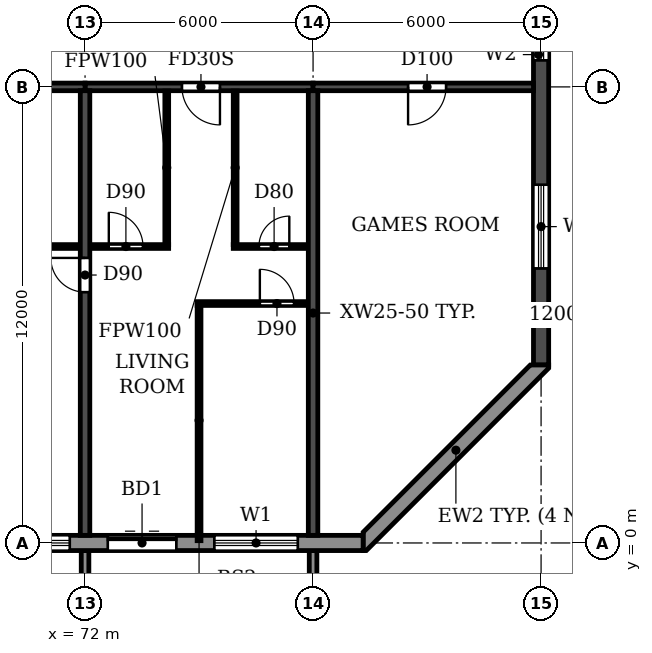
"""IFC4 building model, lengths in metres.
Left out: names, types, materials, properties, quantities, classifications, styles, units other than length and angle.
Written with IfcOpenShell. Run it as: python <this file> out.ifc"""

import sys

from ifc_helpers import new_model, si_unit, direction, frame, frame_2d, origin, place, context, subcontext, project, spatial, polyline, rectangle, outline, extrude, source, transform, mapped, element, fill, save


model = new_model("IFC4")
c1 = context("Model", 3, precision=1e-05, world=origin(), true_north=direction((0.0, 1.0)))
c2 = subcontext(c1, "Body", "Model", "MODEL_VIEW")
j1 = project(units=[si_unit("LENGTHUNIT", "METRE"), si_unit("PLANEANGLEUNIT", "RADIAN")], contexts=[c1])
p1 = place(None, origin())
s1 = spatial("IfcSite", under=j1, at=p1, CompositionType="ELEMENT")
p2 = place(p1, origin())
s2 = spatial("IfcBuilding", under=s1, at=p2, CompositionType="ELEMENT")
p3 = place(p2, frame((0.0, 0.0, 181.8)))
s3 = spatial("IfcBuildingStorey", under=s2, at=p3, CompositionType="ELEMENT", Elevation=181.8)
p4 = place(p3, frame((72.0, 0.2, 0.0), z_axis=(0.0, 0.0, 1.0), x_axis=(0.0, 1.0, 0.0)))
e1 = element("IfcWall", 1, at=p4, inside=s3, PredefinedType="SHEAR", context=c2, shape_type="SweptSolid", body=[
    extrude(rectangle(XDim=11.7, YDim=0.25, at=frame_2d((5.85, 0.0))), origin(), (0.0, 0.0, 1.0), 3.08),
])
p5 = place(p4, frame((6.4, 0.0, 0.0)))
e2 = element("IfcOpeningElement", 2, at=p5, cuts=e1, PredefinedType="OPENING", context=c2, shape_type="SweptSolid", body=[
    extrude(rectangle(XDim=0.9, YDim=2.1, at=frame_2d((0.45, 1.05))), frame((0.0, 0.135, 0.0), z_axis=(0.0, -1.0, 0.0), x_axis=(1.0, 0.0, 0.0)), (0.0, 0.0, 1.0), 0.27),
])
p6 = place(p3, frame((78.0, 0.2, 0.0), z_axis=(0.0, 0.0, 1.0), x_axis=(0.0, 1.0, 0.0)))
e3 = element("IfcWall", 3, at=p6, inside=s3, PredefinedType="SHEAR", context=c2, shape_type="SweptSolid", body=[
    extrude(rectangle(XDim=11.7, YDim=0.25, at=frame_2d((5.85, 0.0))), origin(), (0.0, 0.0, 1.0), 3.08),
])
p7 = place(p3, frame((84.0, 4.683, 0.0), z_axis=(0.0, 0.0, 1.0), x_axis=(0.0, 1.0, 0.0)))
e4 = element("IfcWall", 4, at=p7, inside=s3, PredefinedType="SHEAR", context=c2, shape_type="SweptSolid", body=[
    extrude(rectangle(XDim=31.834, YDim=0.4, at=frame_2d((15.917, 0.0))), origin(), (0.0, 0.0, 1.0), 3.08),
])
p8 = place(p7, frame((23.817, 0.0, 0.9)))
e5 = element("IfcOpeningElement", 5, at=p8, cuts=e4, PredefinedType="OPENING", context=c2, shape_type="SweptSolid", body=[
    extrude(rectangle(XDim=1.2, YDim=1.5, at=frame_2d((0.6, 0.75))), frame((0.0, 0.21, 0.0), z_axis=(0.0, -1.0, 0.0), x_axis=(1.0, 0.0, 0.0)), (0.0, 0.0, 1.0), 0.42),
])
p9 = place(p7, frame((8.017, 0.0, 0.9)))
e6 = element("IfcOpeningElement", 6, at=p9, cuts=e4, PredefinedType="OPENING", context=c2, shape_type="SweptSolid", body=[
    extrude(rectangle(XDim=1.2, YDim=1.5, at=frame_2d((0.6, 0.75))), frame((0.0, 0.21, 0.0), z_axis=(0.0, -1.0, 0.0), x_axis=(1.0, 0.0, 0.0)), (0.0, 0.0, 1.0), 0.42),
])
p10 = place(p7, frame((27.694, 0.0, 0.6)))
e7 = element("IfcOpeningElement", 7, at=p10, cuts=e4, PredefinedType="OPENING", context=c2, shape_type="SweptSolid", body=[
    extrude(rectangle(XDim=2.2, YDim=1.8, at=frame_2d((1.1, 0.9))), frame((0.0, 0.21, 0.0), z_axis=(0.0, -1.0, 0.0), x_axis=(1.0, 0.0, 0.0)), (0.0, 0.0, 1.0), 0.42),
])
p11 = place(p7, frame((2.541, 0.0, 0.6)))
e8 = element("IfcOpeningElement", 8, at=p11, cuts=e4, PredefinedType="OPENING", context=c2, shape_type="SweptSolid", body=[
    extrude(rectangle(XDim=2.2, YDim=1.8, at=frame_2d((1.1, 0.9))), frame((0.0, 0.21, 0.0), z_axis=(0.0, -1.0, 0.0), x_axis=(1.0, 0.0, 0.0)), (0.0, 0.0, 1.0), 0.42),
])
p12 = place(p7, frame((15.917, 0.0, 0.9)))
e9 = element("IfcOpeningElement", 9, at=p12, cuts=e4, PredefinedType="OPENING", context=c2, shape_type="SweptSolid", body=[
    extrude(rectangle(XDim=1.2, YDim=1.5, at=frame_2d((0.6, 0.75))), frame((0.0, 0.21, 0.0), z_axis=(0.0, -1.0, 0.0), x_axis=(1.0, 0.0, 0.0)), (0.0, 0.0, 1.0), 0.42),
])
p13 = place(p3, frame((66.0, 12.0, 0.0), z_axis=(0.0, 0.0, 1.0), x_axis=(1.0, 0.0, 0.0)))
e10 = element("IfcWall", 10, at=p13, inside=s3, PredefinedType="SHEAR", context=c2, shape_type="SweptSolid", body=[
    extrude(rectangle(XDim=6.0, YDim=0.2, at=frame_2d((3.0, 0.0))), origin(), (0.0, 0.0, 1.0), 2.48),
])
p14 = place(p3, frame((72.0, 12.0, 0.0), z_axis=(0.0, 0.0, 1.0), x_axis=(1.0, 0.0, 0.0)))
e11 = element("IfcWall", 11, at=p14, inside=s3, PredefinedType="SHEAR", context=c2, shape_type="SweptSolid", body=[
    extrude(rectangle(XDim=6.0, YDim=0.2, at=frame_2d((3.0, 0.0))), origin(), (0.0, 0.0, 1.0), 2.48),
])
p15 = place(p14, frame((2.55, 0.0, 0.0)))
e12 = element("IfcOpeningElement", 12, at=p15, cuts=e11, PredefinedType="OPENING", context=c2, shape_type="SweptSolid", body=[
    extrude(rectangle(XDim=1.0, YDim=2.1, at=frame_2d((0.5, 1.05))), frame((0.0, 0.11, 0.0), z_axis=(0.0, -1.0, 0.0), x_axis=(1.0, 0.0, 0.0)), (0.0, 0.0, 1.0), 0.22),
])
p16 = place(p3, frame((78.0, 12.0, 0.0), z_axis=(0.0, 0.0, 1.0), x_axis=(1.0, 0.0, 0.0)))
e13 = element("IfcWall", 13, at=p16, inside=s3, PredefinedType="SHEAR", context=c2, shape_type="SweptSolid", body=[
    extrude(rectangle(XDim=5.8, YDim=0.2, at=frame_2d((2.9, 0.0))), origin(), (0.0, 0.0, 1.0), 2.48),
])
p17 = place(p16, frame((2.5, 0.0, 0.0)))
e14 = element("IfcOpeningElement", 14, at=p17, cuts=e13, PredefinedType="OPENING", context=c2, shape_type="SweptSolid", body=[
    extrude(rectangle(XDim=1.0, YDim=2.1, at=frame_2d((0.5, 1.05))), frame((0.0, 0.11, 0.0), z_axis=(0.0, -1.0, 0.0), x_axis=(1.0, 0.0, 0.0)), (0.0, 0.0, 1.0), 0.22),
])
p18 = place(p3, frame((22.683, 0.0, 0.0), z_axis=(0.0, 0.0, 1.0), x_axis=(1.0, 0.0, 0.0)))
e15 = element("IfcWall", 15, at=p18, inside=s3, PredefinedType="STANDARD", context=c2, shape_type="SweptSolid", body=[
    extrude(rectangle(XDim=56.634, YDim=0.4, at=frame_2d((28.317, 0.0))), origin(), (0.0, 0.0, 1.0), 3.08),
])
p19 = place(p18, frame((1.717, 0.0, 0.9)))
e16 = element("IfcOpeningElement", 16, at=p19, cuts=e15, PredefinedType="OPENING", context=c2, shape_type="SweptSolid", body=[
    extrude(rectangle(XDim=2.2, YDim=1.5, at=frame_2d((1.1, 0.75))), frame((0.0, 0.21, 0.0), z_axis=(0.0, -1.0, 0.0), x_axis=(1.0, 0.0, 0.0)), (0.0, 0.0, 1.0), 0.42),
])
p20 = place(p18, frame((4.917, 0.0, 0.0)))
e17 = element("IfcOpeningElement", 17, at=p20, cuts=e15, PredefinedType="OPENING", context=c2, shape_type="SweptSolid", body=[
    extrude(rectangle(XDim=1.8, YDim=2.4, at=frame_2d((0.9, 1.2))), frame((0.0, 0.21, 0.0), z_axis=(0.0, -1.0, 0.0), x_axis=(1.0, 0.0, 0.0)), (0.0, 0.0, 1.0), 0.42),
])
p21 = place(p18, frame((7.717, 0.0, 0.9)))
e18 = element("IfcOpeningElement", 18, at=p21, cuts=e15, PredefinedType="OPENING", context=c2, shape_type="SweptSolid", body=[
    extrude(rectangle(XDim=2.2, YDim=1.5, at=frame_2d((1.1, 0.75))), frame((0.0, 0.21, 0.0), z_axis=(0.0, -1.0, 0.0), x_axis=(1.0, 0.0, 0.0)), (0.0, 0.0, 1.0), 0.42),
])
p22 = place(p18, frame((10.717, 0.0, 0.9)))
e19 = element("IfcOpeningElement", 19, at=p22, cuts=e15, PredefinedType="OPENING", context=c2, shape_type="SweptSolid", body=[
    extrude(rectangle(XDim=2.2, YDim=1.5, at=frame_2d((1.1, 0.75))), frame((0.0, 0.21, 0.0), z_axis=(0.0, -1.0, 0.0), x_axis=(1.0, 0.0, 0.0)), (0.0, 0.0, 1.0), 0.42),
])
p23 = place(p18, frame((13.717, 0.0, 0.9)))
e20 = element("IfcOpeningElement", 20, at=p23, cuts=e15, PredefinedType="OPENING", context=c2, shape_type="SweptSolid", body=[
    extrude(rectangle(XDim=2.2, YDim=1.5, at=frame_2d((1.1, 0.75))), frame((0.0, 0.21, 0.0), z_axis=(0.0, -1.0, 0.0), x_axis=(1.0, 0.0, 0.0)), (0.0, 0.0, 1.0), 0.42),
])
p24 = place(p18, frame((16.717, 0.0, 0.9)))
e21 = element("IfcOpeningElement", 21, at=p24, cuts=e15, PredefinedType="OPENING", context=c2, shape_type="SweptSolid", body=[
    extrude(rectangle(XDim=2.2, YDim=1.5, at=frame_2d((1.1, 0.75))), frame((0.0, 0.21, 0.0), z_axis=(0.0, -1.0, 0.0), x_axis=(1.0, 0.0, 0.0)), (0.0, 0.0, 1.0), 0.42),
])
p25 = place(p18, frame((19.717, 0.0, 0.9)))
e22 = element("IfcOpeningElement", 22, at=p25, cuts=e15, PredefinedType="OPENING", context=c2, shape_type="SweptSolid", body=[
    extrude(rectangle(XDim=2.2, YDim=1.5, at=frame_2d((1.1, 0.75))), frame((0.0, 0.21, 0.0), z_axis=(0.0, -1.0, 0.0), x_axis=(1.0, 0.0, 0.0)), (0.0, 0.0, 1.0), 0.42),
])
p26 = place(p18, frame((22.717, 0.0, 0.9)))
e23 = element("IfcOpeningElement", 23, at=p26, cuts=e15, PredefinedType="OPENING", context=c2, shape_type="SweptSolid", body=[
    extrude(rectangle(XDim=2.2, YDim=1.5, at=frame_2d((1.1, 0.75))), frame((0.0, 0.21, 0.0), z_axis=(0.0, -1.0, 0.0), x_axis=(1.0, 0.0, 0.0)), (0.0, 0.0, 1.0), 0.42),
])
p27 = place(p18, frame((25.717, 0.0, 0.9)))
e24 = element("IfcOpeningElement", 24, at=p27, cuts=e15, PredefinedType="OPENING", context=c2, shape_type="SweptSolid", body=[
    extrude(rectangle(XDim=2.2, YDim=1.5, at=frame_2d((1.1, 0.75))), frame((0.0, 0.21, 0.0), z_axis=(0.0, -1.0, 0.0), x_axis=(1.0, 0.0, 0.0)), (0.0, 0.0, 1.0), 0.42),
])
p28 = place(p18, frame((28.717, 0.0, 0.9)))
e25 = element("IfcOpeningElement", 25, at=p28, cuts=e15, PredefinedType="OPENING", context=c2, shape_type="SweptSolid", body=[
    extrude(rectangle(XDim=2.2, YDim=1.5, at=frame_2d((1.1, 0.75))), frame((0.0, 0.21, 0.0), z_axis=(0.0, -1.0, 0.0), x_axis=(1.0, 0.0, 0.0)), (0.0, 0.0, 1.0), 0.42),
])
p29 = place(p18, frame((31.717, 0.0, 0.9)))
e26 = element("IfcOpeningElement", 26, at=p29, cuts=e15, PredefinedType="OPENING", context=c2, shape_type="SweptSolid", body=[
    extrude(rectangle(XDim=2.2, YDim=1.5, at=frame_2d((1.1, 0.75))), frame((0.0, 0.21, 0.0), z_axis=(0.0, -1.0, 0.0), x_axis=(1.0, 0.0, 0.0)), (0.0, 0.0, 1.0), 0.42),
])
p30 = place(p18, frame((34.717, 0.0, 0.9)))
e27 = element("IfcOpeningElement", 27, at=p30, cuts=e15, PredefinedType="OPENING", context=c2, shape_type="SweptSolid", body=[
    extrude(rectangle(XDim=2.2, YDim=1.5, at=frame_2d((1.1, 0.75))), frame((0.0, 0.21, 0.0), z_axis=(0.0, -1.0, 0.0), x_axis=(1.0, 0.0, 0.0)), (0.0, 0.0, 1.0), 0.42),
])
p31 = place(p18, frame((37.917, 0.0, 0.0)))
e28 = element("IfcOpeningElement", 28, at=p31, cuts=e15, PredefinedType="OPENING", context=c2, shape_type="SweptSolid", body=[
    extrude(rectangle(XDim=1.8, YDim=2.4, at=frame_2d((0.9, 1.2))), frame((0.0, 0.21, 0.0), z_axis=(0.0, -1.0, 0.0), x_axis=(1.0, 0.0, 0.0)), (0.0, 0.0, 1.0), 0.42),
])
p32 = place(p18, frame((40.717, 0.0, 0.9)))
e29 = element("IfcOpeningElement", 29, at=p32, cuts=e15, PredefinedType="OPENING", context=c2, shape_type="SweptSolid", body=[
    extrude(rectangle(XDim=2.2, YDim=1.5, at=frame_2d((1.1, 0.75))), frame((0.0, 0.21, 0.0), z_axis=(0.0, -1.0, 0.0), x_axis=(1.0, 0.0, 0.0)), (0.0, 0.0, 1.0), 0.42),
])
p33 = place(p18, frame((43.717, 0.0, 0.9)))
e30 = element("IfcOpeningElement", 30, at=p33, cuts=e15, PredefinedType="OPENING", context=c2, shape_type="SweptSolid", body=[
    extrude(rectangle(XDim=2.2, YDim=1.5, at=frame_2d((1.1, 0.75))), frame((0.0, 0.21, 0.0), z_axis=(0.0, -1.0, 0.0), x_axis=(1.0, 0.0, 0.0)), (0.0, 0.0, 1.0), 0.42),
])
p34 = place(p18, frame((46.717, 0.0, 0.9)))
e31 = element("IfcOpeningElement", 31, at=p34, cuts=e15, PredefinedType="OPENING", context=c2, shape_type="SweptSolid", body=[
    extrude(rectangle(XDim=2.2, YDim=1.5, at=frame_2d((1.1, 0.75))), frame((0.0, 0.21, 0.0), z_axis=(0.0, -1.0, 0.0), x_axis=(1.0, 0.0, 0.0)), (0.0, 0.0, 1.0), 0.42),
])
p35 = place(p18, frame((49.917, 0.0, 0.0)))
e32 = element("IfcOpeningElement", 32, at=p35, cuts=e15, PredefinedType="OPENING", context=c2, shape_type="SweptSolid", body=[
    extrude(rectangle(XDim=1.8, YDim=2.4, at=frame_2d((0.9, 1.2))), frame((0.0, 0.21, 0.0), z_axis=(0.0, -1.0, 0.0), x_axis=(1.0, 0.0, 0.0)), (0.0, 0.0, 1.0), 0.42),
])
p36 = place(p18, frame((52.717, 0.0, 0.9)))
e33 = element("IfcOpeningElement", 33, at=p36, cuts=e15, PredefinedType="OPENING", context=c2, shape_type="SweptSolid", body=[
    extrude(rectangle(XDim=2.2, YDim=1.5, at=frame_2d((1.1, 0.75))), frame((0.0, 0.21, 0.0), z_axis=(0.0, -1.0, 0.0), x_axis=(1.0, 0.0, 0.0)), (0.0, 0.0, 1.0), 0.42),
])
p37 = place(p3, origin())
e34 = element("IfcWall", 34, at=p37, inside=s3, PredefinedType="STANDARD", context=c2, shape_type="SweptSolid", body=[
    extrude(outline(polyline([(79.317, -0.2), (79.4, -0.2), (84.2, 4.6), (84.2, 4.683), (83.717, 4.683), (79.317, 0.283), (79.317, -0.2)])), origin(), (0.0, 0.0, 1.0), 3.08),
])
m1 = source(origin(), c2, "Body", "SweptSolid", [
    extrude(outline(polyline([(0.0, 0.0), (0.2, 0.0), (0.2, 1.65), (0.0, 1.65), (0.0, 0.0)])), origin(), (0.0, 0.0, 1.0), 3.1),
])
for number, where in (
    (35, (71.9, -1.85, 0.0)),
    (36, (77.9, -1.85, 0.0)),
):
    element("IfcWall", number, at=place(p3, frame(where)), inside=s3, PredefinedType="STANDARD", context=c2, shape_type="MappedRepresentation", body=[
        mapped(m1, transform((0.0, 0.0, 0.0))),
    ])
p38 = place(p3, frame((74.95, 6.3, 0.0), z_axis=(0.0, 0.0, 1.0), x_axis=(1.0, 0.0, 0.0)))
e37 = element("IfcWall", 37, at=p38, inside=s3, PredefinedType="PARTITIONING", context=c2, shape_type="SweptSolid", body=[
    extrude(rectangle(XDim=2.915, YDim=0.1, at=frame_2d((1.458, 0.0))), origin(), (0.0, 0.0, 1.0), 3.08),
])
p39 = place(p38, frame((1.65, 0.0, 0.0)))
e38 = element("IfcOpeningElement", 38, at=p39, cuts=e37, PredefinedType="OPENING", context=c2, shape_type="SweptSolid", body=[
    extrude(rectangle(XDim=0.9, YDim=2.1, at=frame_2d((0.45, 1.05))), frame((0.0, 0.06, 0.0), z_axis=(0.0, -1.0, 0.0), x_axis=(1.0, 0.0, 0.0)), (0.0, 0.0, 1.0), 0.12),
])
p40 = place(p3, frame((68.9, 7.8, 0.0), z_axis=(0.0, 0.0, 1.0), x_axis=(1.0, 0.0, 0.0)))
e39 = element("IfcWall", 39, at=p40, inside=s3, PredefinedType="PARTITIONING", context=c2, shape_type="SweptSolid", body=[
    extrude(rectangle(XDim=2.965, YDim=0.1, at=frame_2d((1.482, 0.0))), origin(), (0.0, 0.0, 1.0), 3.08),
])
p41 = place(p40, frame((1.2, 0.0, 0.0)))
e40 = element("IfcOpeningElement", 40, at=p41, cuts=e39, PredefinedType="OPENING", context=c2, shape_type="SweptSolid", body=[
    extrude(rectangle(XDim=0.8, YDim=2.1, at=frame_2d((0.4, 1.05))), frame((0.0, 0.06, 0.0), z_axis=(0.0, -1.0, 0.0), x_axis=(1.0, 0.0, 0.0)), (0.0, 0.0, 1.0), 0.12),
])
p42 = place(p3, frame((72.135, 7.8, 0.0), z_axis=(0.0, 0.0, 1.0), x_axis=(1.0, 0.0, 0.0)))
e41 = element("IfcWall", 41, at=p42, inside=s3, PredefinedType="PARTITIONING", context=c2, shape_type="SweptSolid", body=[
    extrude(rectangle(XDim=2.065, YDim=0.1, at=frame_2d((1.032, 0.0))), origin(), (0.0, 0.0, 1.0), 3.08),
])
p43 = place(p42, frame((0.49, 0.0, 0.0)))
e42 = element("IfcOpeningElement", 42, at=p43, cuts=e41, PredefinedType="OPENING", context=c2, shape_type="SweptSolid", body=[
    extrude(rectangle(XDim=0.9, YDim=2.1, at=frame_2d((0.45, 1.05))), frame((0.0, 0.06, 0.0), z_axis=(0.0, -1.0, 0.0), x_axis=(1.0, 0.0, 0.0)), (0.0, 0.0, 1.0), 0.12),
])
p44 = place(p3, frame((75.9, 7.8, 0.0), z_axis=(0.0, 0.0, 1.0), x_axis=(1.0, 0.0, 0.0)))
e43 = element("IfcWall", 43, at=p44, inside=s3, PredefinedType="PARTITIONING", context=c2, shape_type="SweptSolid", body=[
    extrude(rectangle(XDim=1.965, YDim=0.1, at=frame_2d((0.982, 0.0))), origin(), (0.0, 0.0, 1.0), 3.08),
])
p45 = place(p44, frame((0.675, 0.0, 0.0)))
e44 = element("IfcOpeningElement", 44, at=p45, cuts=e43, PredefinedType="OPENING", context=c2, shape_type="SweptSolid", body=[
    extrude(rectangle(XDim=0.8, YDim=2.1, at=frame_2d((0.4, 1.05))), frame((0.0, 0.06, 0.0), z_axis=(0.0, -1.0, 0.0), x_axis=(1.0, 0.0, 0.0)), (0.0, 0.0, 1.0), 0.12),
])
p46 = place(p3, frame((74.15, 7.85, 0.0), z_axis=(0.0, 0.0, 1.0), x_axis=(0.0, 1.0, 0.0)))
e45 = element("IfcWall", 45, at=p46, inside=s3, PredefinedType="PARTITIONING", context=c2, shape_type="SweptSolid", body=[
    extrude(rectangle(XDim=4.04, YDim=0.1, at=frame_2d((2.02, 0.0))), origin(), (0.0, 0.0, 1.0), 3.08),
])
p47 = place(p3, frame((75.0, 0.06, 0.0), z_axis=(0.0, 0.0, 1.0), x_axis=(0.0, 1.0, 0.0)))
e46 = element("IfcWall", 46, at=p47, inside=s3, PredefinedType="PARTITIONING", context=c2, shape_type="SweptSolid", body=[
    extrude(rectangle(XDim=6.19, YDim=0.1, at=frame_2d((3.095, 0.0))), origin(), (0.0, 0.0, 1.0), 3.08),
])
p48 = place(p3, frame((75.95, 7.85, 0.0), z_axis=(0.0, 0.0, 1.0), x_axis=(0.0, 1.0, 0.0)))
e47 = element("IfcWall", 47, at=p48, inside=s3, PredefinedType="PARTITIONING", context=c2, shape_type="SweptSolid", body=[
    extrude(rectangle(XDim=4.04, YDim=0.1, at=frame_2d((2.02, 0.0))), origin(), (0.0, 0.0, 1.0), 3.08),
])
p49 = place(p34, origin())
e48 = element("IfcWindow", 48, at=p49, inside=s3, PartitioningType="DOUBLE_PANEL_HORIZONTAL", PredefinedType="WINDOW", context=c2, shape_type="SweptSolid", body=[
    extrude(rectangle(XDim=2.2, YDim=1.5, at=frame_2d((1.1, 0.75))), frame((0.0, 0.03, 0.0), z_axis=(0.0, -1.0, 0.0), x_axis=(1.0, 0.0, 0.0)), (0.0, 0.0, 1.0), 0.06),
])
fill(e31, e48)
p50 = place(p35, origin())
e49 = element("IfcDoor", 49, at=p50, inside=s3, OperationType="DOUBLE_DOOR_SLIDING", PredefinedType="DOOR", context=c2, shape_type="SweptSolid", body=[
    extrude(rectangle(XDim=1.8, YDim=2.4, at=frame_2d((0.9, 1.2))), frame((0.0, 0.025, 0.0), z_axis=(0.0, -1.0, 0.0), x_axis=(1.0, 0.0, 0.0)), (0.0, 0.0, 1.0), 0.05),
])
fill(e32, e49)
p51 = place(p36, origin())
e50 = element("IfcWindow", 50, at=p51, inside=s3, PartitioningType="DOUBLE_PANEL_HORIZONTAL", PredefinedType="WINDOW", context=c2, shape_type="SweptSolid", body=[
    extrude(rectangle(XDim=2.2, YDim=1.5, at=frame_2d((1.1, 0.75))), frame((0.0, 0.03, 0.0), z_axis=(0.0, -1.0, 0.0), x_axis=(1.0, 0.0, 0.0)), (0.0, 0.0, 1.0), 0.06),
])
fill(e33, e50)
p52 = place(p9, origin())
e51 = element("IfcWindow", 51, at=p52, inside=s3, PartitioningType="SINGLE_PANEL", PredefinedType="WINDOW", context=c2, shape_type="SweptSolid", body=[
    extrude(rectangle(XDim=1.2, YDim=1.5, at=frame_2d((0.6, 0.75))), frame((0.0, 0.03, 0.0), z_axis=(0.0, -1.0, 0.0), x_axis=(1.0, 0.0, 0.0)), (0.0, 0.0, 1.0), 0.06),
])
fill(e6, e51)
p53 = place(p11, origin())
e52 = element("IfcWindow", 52, at=p53, inside=s3, PartitioningType="DOUBLE_PANEL_HORIZONTAL", PredefinedType="WINDOW", context=c2, shape_type="SweptSolid", body=[
    extrude(rectangle(XDim=2.2, YDim=1.8, at=frame_2d((1.1, 0.9))), frame((0.0, 0.03, 0.0), z_axis=(0.0, -1.0, 0.0), x_axis=(1.0, 0.0, 0.0)), (0.0, 0.0, 1.0), 0.06),
])
fill(e8, e52)
p54 = place(p5, origin())
e53 = element("IfcDoor", 53, at=p54, inside=s3, OperationType="SINGLE_SWING_RIGHT", PredefinedType="DOOR", context=c2, shape_type="SweptSolid", body=[
    extrude(rectangle(XDim=0.9, YDim=2.1, at=frame_2d((0.45, 1.05))), frame((0.0, 0.025, 0.0), z_axis=(0.0, -1.0, 0.0), x_axis=(1.0, 0.0, 0.0)), (0.0, 0.0, 1.0), 0.05),
])
fill(e2, e53)
p55 = place(p43, origin())
e54 = element("IfcDoor", 54, at=p55, inside=s3, OperationType="SINGLE_SWING_LEFT", PredefinedType="DOOR", context=c2, shape_type="SweptSolid", body=[
    extrude(rectangle(XDim=0.9, YDim=2.1, at=frame_2d((0.45, 1.05))), frame((0.0, 0.025, 0.0), z_axis=(0.0, -1.0, 0.0), x_axis=(1.0, 0.0, 0.0)), (0.0, 0.0, 1.0), 0.05),
])
fill(e42, e54)
p56 = place(p15, frame((1.0, 0.0, 0.0), z_axis=(0.0, 0.0, 1.0), x_axis=(-1.0, 0.0, 0.0)))
e55 = element("IfcDoor", 55, at=p56, inside=s3, OperationType="SINGLE_SWING_LEFT", PredefinedType="DOOR", context=c2, shape_type="SweptSolid", body=[
    extrude(rectangle(XDim=1.0, YDim=2.1, at=frame_2d((0.5, 1.05))), frame((0.0, 0.025, 0.0), z_axis=(0.0, -1.0, 0.0), x_axis=(1.0, 0.0, 0.0)), (0.0, 0.0, 1.0), 0.05),
])
fill(e12, e55)
p57 = place(p45, origin())
e56 = element("IfcDoor", 56, at=p57, inside=s3, OperationType="SINGLE_SWING_RIGHT", PredefinedType="DOOR", context=c2, shape_type="SweptSolid", body=[
    extrude(rectangle(XDim=0.8, YDim=2.1, at=frame_2d((0.4, 1.05))), frame((0.0, 0.025, 0.0), z_axis=(0.0, -1.0, 0.0), x_axis=(1.0, 0.0, 0.0)), (0.0, 0.0, 1.0), 0.05),
])
fill(e44, e56)
p58 = place(p39, origin())
e57 = element("IfcDoor", 57, at=p58, inside=s3, OperationType="SINGLE_SWING_LEFT", PredefinedType="DOOR", context=c2, shape_type="SweptSolid", body=[
    extrude(rectangle(XDim=0.9, YDim=2.1, at=frame_2d((0.45, 1.05))), frame((0.0, 0.025, 0.0), z_axis=(0.0, -1.0, 0.0), x_axis=(1.0, 0.0, 0.0)), (0.0, 0.0, 1.0), 0.05),
])
fill(e38, e57)
p59 = place(p17, frame((1.0, 0.0, 0.0), z_axis=(0.0, 0.0, 1.0), x_axis=(-1.0, 0.0, 0.0)))
e58 = element("IfcDoor", 58, at=p59, inside=s3, OperationType="SINGLE_SWING_RIGHT", PredefinedType="DOOR", context=c2, shape_type="SweptSolid", body=[
    extrude(rectangle(XDim=1.0, YDim=2.1, at=frame_2d((0.5, 1.05))), frame((0.0, 0.025, 0.0), z_axis=(0.0, -1.0, 0.0), x_axis=(1.0, 0.0, 0.0)), (0.0, 0.0, 1.0), 0.05),
])
fill(e14, e58)
save(model, sys.argv[1])
